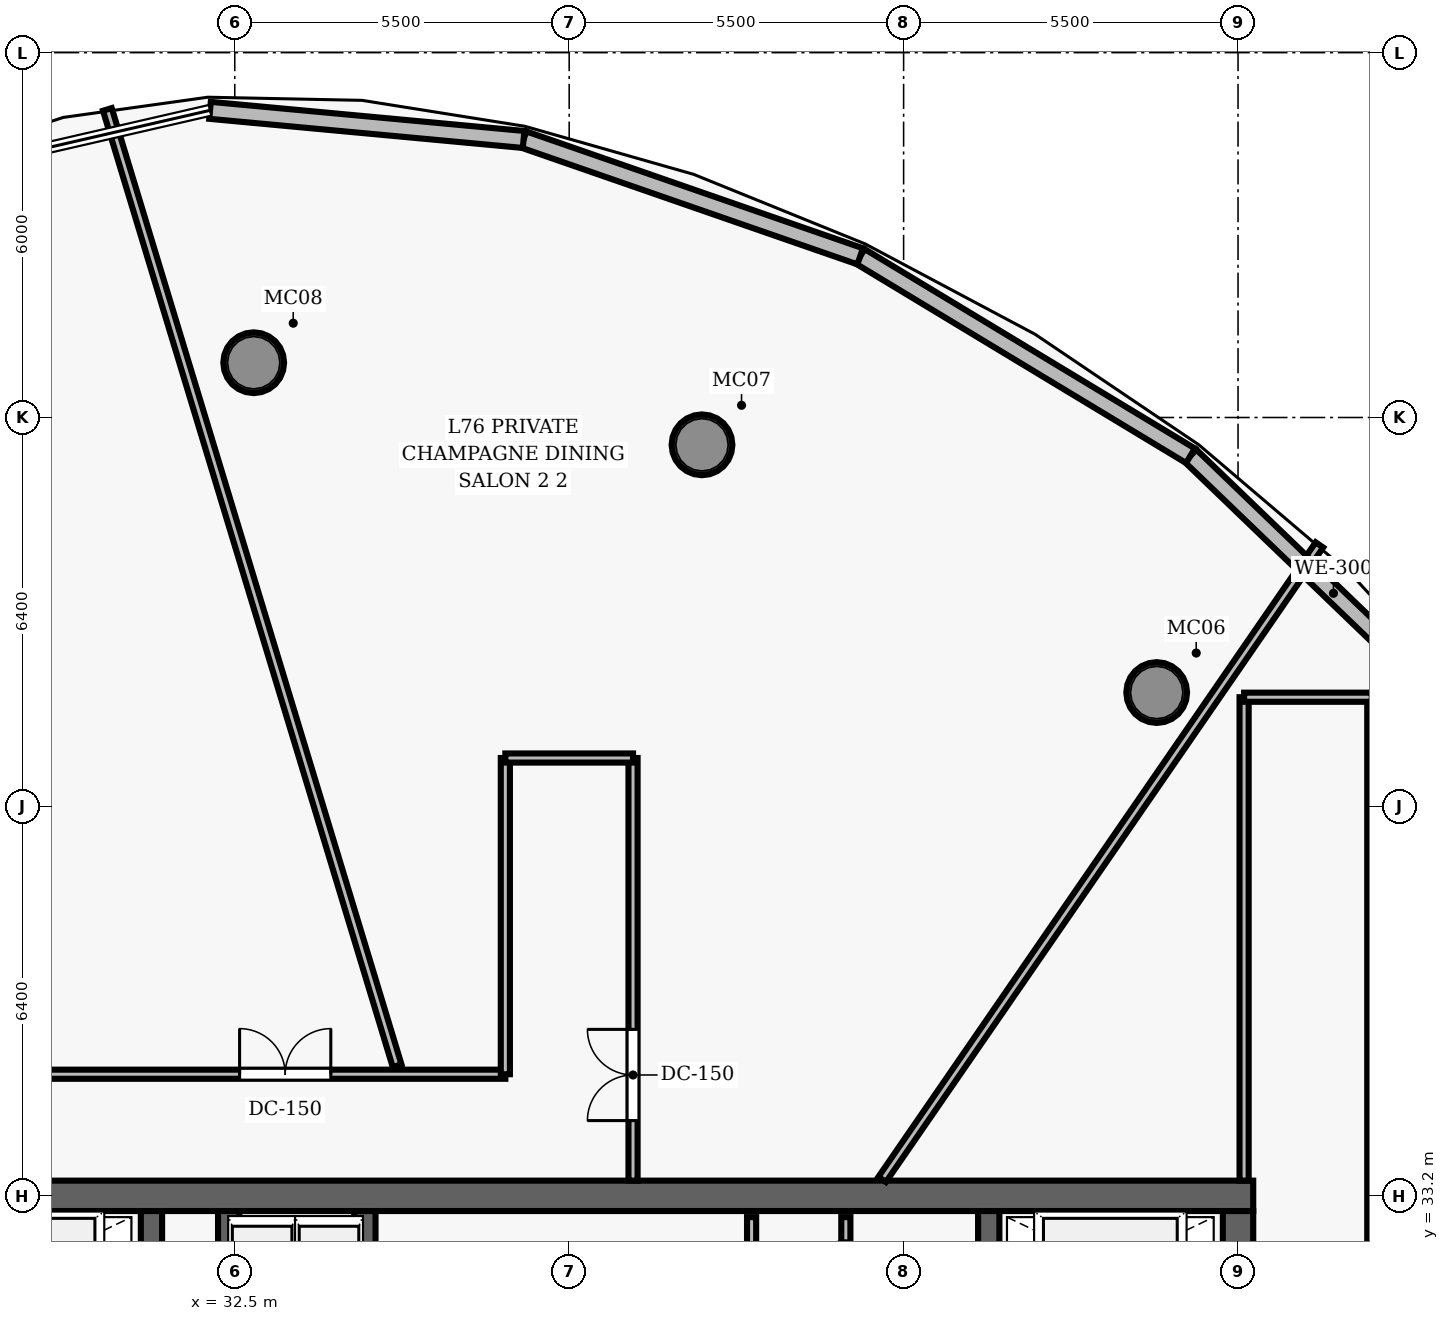
"""IFC4 building model, lengths in metres.
Left out: names, types, materials, properties, quantities, classifications, styles, units other than length and angle.
Written with IfcOpenShell. Run it as: python <this file> out.ifc"""

import sys

from ifc_helpers import new_model, si_unit, direction, frame, frame_2d, origin, origin_2d, place, context, subcontext, project, spatial, rectangle, hollow_circle, extrude, element, fill, save


model = new_model("IFC4")
c1 = context("Model", 3, precision=1e-05, world=origin(), true_north=direction((0.0, 1.0)))
c2 = subcontext(c1, "Body", "Model", "MODEL_VIEW")
j1 = project(units=[si_unit("LENGTHUNIT", "METRE"), si_unit("PLANEANGLEUNIT", "RADIAN")], contexts=[c1])
p1 = place(None, origin())
s1 = spatial("IfcSite", under=j1, at=p1, CompositionType="ELEMENT")
p2 = place(p1, origin())
s2 = spatial("IfcBuilding", under=s1, at=p2, CompositionType="ELEMENT")
p3 = place(p2, frame((0.0, 0.0, 299.8)))
s3 = spatial("IfcBuildingStorey", under=s2, at=p3, CompositionType="ELEMENT", Elevation=299.8)
p4 = place(p3, frame((26.75, 33.2, 0.0), z_axis=(0.0, 0.0, 1.0), x_axis=(1.0, 0.0, 0.0)))
e1 = element("IfcWall", 1, at=p4, inside=s3, PredefinedType="SHEAR", context=c2, shape_type="SweptSolid", body=[
    extrude(rectangle(XDim=22.5, YDim=0.5, at=frame_2d((11.25, 0.0))), origin(), (0.0, 0.0, 1.0), 3.85),
])
p5 = place(p3, frame((49.0, 19.05, 0.0), z_axis=(0.0, 0.0, 1.0), x_axis=(0.0, 1.0, 0.0)))
e2 = element("IfcWall", 2, at=p5, inside=s3, PredefinedType="SHEAR", context=c2, shape_type="SweptSolid", body=[
    extrude(rectangle(XDim=13.9, YDim=0.5, at=frame_2d((6.95, 0.0))), origin(), (0.0, 0.0, 1.0), 3.85),
])
p6 = place(p5, frame((8.2, 0.0, 0.0)))
e3 = element("IfcOpeningElement", 3, at=p6, cuts=e2, PredefinedType="OPENING", context=c2, shape_type="SweptSolid", body=[
    extrude(rectangle(XDim=1.05, YDim=2.15, at=frame_2d((0.525, 1.075))), frame((0.0, 0.26, 0.0), z_axis=(0.0, -1.0, 0.0), x_axis=(1.0, 0.0, 0.0)), (0.0, 0.0, 1.0), 0.52),
])
for number, where, z_axis, x_axis in (
    (4, (31.13, 19.05, 0.0), (0.0, 0.0, 1.0), (0.0, 1.0, 0.0)),
    (5, (44.9, 19.05, 0.0), (0.0, 0.0, 1.0), (0.0, 1.0, 0.0)),
):
    element("IfcWall", number, at=place(p3, frame(where, z_axis=z_axis, x_axis=x_axis)), inside=s3, PredefinedType="SHEAR", context=c2, shape_type="SweptSolid", body=[
        extrude(rectangle(XDim=13.9, YDim=0.35, at=frame_2d((6.95, 0.0))), origin(), (0.0, 0.0, 1.0), 3.85),
    ])
for number, where, z_axis, x_axis in (
    (6, (47.662, 41.477, 0.0), (0.0, 0.0, 1.0), (1.0, 0.0, 0.0)),
    (7, (40.185, 45.551, 0.0), (0.0, 0.0, 1.0), (1.0, 0.0, 0.0)),
    (8, (32.812, 46.901, 0.0), (0.0, 0.0, 1.0), (1.0, 0.0, 0.0)),
):
    element("IfcColumn", number, at=place(p3, frame(where, z_axis=z_axis, x_axis=x_axis)), inside=s3, PredefinedType="COLUMN", context=c2, shape_type="SweptSolid", body=[
        extrude(hollow_circle(Radius=0.5, WallThickness=0.045, at=origin_2d()), origin(), (0.0, 0.0, 1.0), 3.85),
    ])
p7 = place(p3, frame((34.64, 26.69, 0.0), z_axis=(0.0, 0.0, 1.0), x_axis=(0.0, 1.0, 0.0)))
e9 = element("IfcWall", 9, at=p7, inside=s3, PredefinedType="SHEAR", context=c2, shape_type="SweptSolid", body=[
    extrude(rectangle(XDim=6.26, YDim=0.35, at=frame_2d((3.13, 0.0))), origin(), (0.0, 0.0, 1.0), 3.85),
])
p8 = place(p7, frame((0.85, 0.0, 0.0)))
e10 = element("IfcOpeningElement", 10, at=p8, cuts=e9, PredefinedType="OPENING", context=c2, shape_type="SweptSolid", body=[
    extrude(rectangle(XDim=1.05, YDim=2.15, at=frame_2d((0.525, 1.075))), frame((0.0, 0.185, 0.0), z_axis=(0.0, -1.0, 0.0), x_axis=(1.0, 0.0, 0.0)), (0.0, 0.0, 1.0), 0.37),
])
p9 = place(p3, frame((32.4, 30.22, 0.0), z_axis=(0.0, 0.0, 1.0), x_axis=(0.0, 1.0, 0.0)))
e11 = element("IfcWall", 11, at=p9, inside=s3, PredefinedType="SHEAR", context=c2, shape_type="SweptSolid", body=[
    extrude(rectangle(XDim=2.73, YDim=0.35, at=frame_2d((1.365, 0.0))), origin(), (0.0, 0.0, 1.0), 3.04),
])
p10 = place(p3, frame((41.0, 28.95, 0.0), z_axis=(0.0, 0.0, 1.0), x_axis=(0.0, 1.0, 0.0)))
e12 = element("IfcWall", 12, at=p10, inside=s3, PredefinedType="PARTITIONING", context=c2, shape_type="SweptSolid", body=[
    extrude(rectangle(XDim=3.9, YDim=0.15, at=frame_2d((1.95, 0.0))), origin(), (0.0, 0.0, 1.0), 3.04),
])
p11 = place(p10, frame((0.7, 0.0, 0.0)))
e13 = element("IfcOpeningElement", 13, at=p11, cuts=e12, PredefinedType="OPENING", context=c2, shape_type="SweptSolid", body=[
    extrude(rectangle(XDim=0.85, YDim=2.1, at=frame_2d((0.425, 1.05))), frame((0.0, 0.085, 0.0), z_axis=(0.0, -1.0, 0.0), x_axis=(1.0, 0.0, 0.0)), (0.0, 0.0, 1.0), 0.17),
])
p12 = place(p3, frame((42.55, 28.1, 0.0), z_axis=(0.0, 0.0, 1.0), x_axis=(0.0, 1.0, 0.0)))
e14 = element("IfcWall", 14, at=p12, inside=s3, PredefinedType="PARTITIONING", context=c2, shape_type="SweptSolid", body=[
    extrude(rectangle(XDim=4.75, YDim=0.15, at=frame_2d((2.375, 0.0))), origin(), (0.0, 0.0, 1.0), 3.04),
])
p13 = place(p12, frame((0.35, 0.0, 0.0)))
e15 = element("IfcOpeningElement", 15, at=p13, cuts=e14, PredefinedType="OPENING", context=c2, shape_type="SweptSolid", body=[
    extrude(rectangle(XDim=0.85, YDim=2.1, at=frame_2d((0.425, 1.05))), frame((0.0, 0.085, 0.0), z_axis=(0.0, -1.0, 0.0), x_axis=(1.0, 0.0, 0.0)), (0.0, 0.0, 1.0), 0.17),
])
p14 = place(p12, frame((1.93, 0.0, 0.0)))
e16 = element("IfcOpeningElement", 16, at=p14, cuts=e14, PredefinedType="OPENING", context=c2, shape_type="SweptSolid", body=[
    extrude(rectangle(XDim=0.85, YDim=2.1, at=frame_2d((0.425, 1.05))), frame((0.0, 0.085, 0.0), z_axis=(0.0, -1.0, 0.0), x_axis=(1.0, 0.0, 0.0)), (0.0, 0.0, 1.0), 0.17),
])
p15 = place(p12, frame((3.51, 0.0, 0.0)))
e17 = element("IfcOpeningElement", 17, at=p15, cuts=e14, PredefinedType="OPENING", context=c2, shape_type="SweptSolid", body=[
    extrude(rectangle(XDim=0.85, YDim=2.1, at=frame_2d((0.425, 1.05))), frame((0.0, 0.085, 0.0), z_axis=(0.0, -1.0, 0.0), x_axis=(1.0, 0.0, 0.0)), (0.0, 0.0, 1.0), 0.17),
])
p16 = place(p3, frame((26.9, 35.2, 0.0), z_axis=(0.0, 0.0, 1.0), x_axis=(1.0, 0.0, 0.0)))
e18 = element("IfcWall", 18, at=p16, inside=s3, PredefinedType="PARTITIONING", context=c2, shape_type="SweptSolid", body=[
    extrude(rectangle(XDim=10.05, YDim=0.15, at=frame_2d((5.025, 0.0))), origin(), (0.0, 0.0, 1.0), 3.04),
])
p17 = place(p16, frame((5.679, 0.0, 0.0)))
e19 = element("IfcOpeningElement", 19, at=p17, cuts=e18, PredefinedType="OPENING", context=c2, shape_type="SweptSolid", body=[
    extrude(rectangle(XDim=1.5, YDim=2.2, at=frame_2d((0.75, 1.1))), frame((0.0, 0.085, 0.0), z_axis=(0.0, -1.0, 0.0), x_axis=(1.0, 0.0, 0.0)), (0.0, 0.0, 1.0), 0.17),
])
p18 = place(p3, frame((51.2, 10.6, 0.0), z_axis=(0.0, 0.0, 1.0), x_axis=(0.0, 1.0, 0.0)))
e20 = element("IfcWall", 20, at=p18, inside=s3, PredefinedType="PARTITIONING", context=c2, shape_type="SweptSolid", body=[
    extrude(rectangle(XDim=30.8, YDim=0.15, at=frame_2d((15.4, 0.0))), origin(), (0.0, 0.0, 1.0), 3.04),
])
p19 = place(p18, frame((18.976, 0.0, 0.0)))
e21 = element("IfcOpeningElement", 21, at=p19, cuts=e20, PredefinedType="OPENING", context=c2, shape_type="SweptSolid", body=[
    extrude(rectangle(XDim=1.5, YDim=2.2, at=frame_2d((0.75, 1.1))), frame((0.0, 0.085, 0.0), z_axis=(0.0, -1.0, 0.0), x_axis=(1.0, 0.0, 0.0)), (0.0, 0.0, 1.0), 0.17),
])
p20 = place(p18, frame((12.135, 0.0, 0.0)))
e22 = element("IfcOpeningElement", 22, at=p20, cuts=e20, PredefinedType="OPENING", context=c2, shape_type="SweptSolid", body=[
    extrude(rectangle(XDim=0.95, YDim=2.15, at=frame_2d((0.475, 1.075))), frame((0.0, 0.085, 0.0), z_axis=(0.0, -1.0, 0.0), x_axis=(1.0, 0.0, 0.0)), (0.0, 0.0, 1.0), 0.17),
])
p21 = place(p3, frame((49.1, 33.45, 0.0), z_axis=(0.0, 0.0, 1.0), x_axis=(0.0, 1.0, 0.0)))
e23 = element("IfcWall", 23, at=p21, inside=s3, PredefinedType="PARTITIONING", context=c2, shape_type="SweptSolid", body=[
    extrude(rectangle(XDim=7.95, YDim=0.15, at=frame_2d((3.975, 0.0))), origin(), (0.0, 0.0, 1.0), 3.04),
])
p22 = place(p3, frame((49.1, 41.4, 0.0), z_axis=(0.0, 0.0, 1.0), x_axis=(1.0, 0.0, 0.0)))
e24 = element("IfcWall", 24, at=p22, inside=s3, PredefinedType="PARTITIONING", context=c2, shape_type="SweptSolid", body=[
    extrude(rectangle(XDim=2.1, YDim=0.15, at=frame_2d((1.05, 0.0))), origin(), (0.0, 0.0, 1.0), 3.04),
])
p23 = place(p3, frame((36.95, 35.2, 0.0), z_axis=(0.0, 0.0, 1.0), x_axis=(0.0, 1.0, 0.0)))
e25 = element("IfcWall", 25, at=p23, inside=s3, PredefinedType="PARTITIONING", context=c2, shape_type="SweptSolid", body=[
    extrude(rectangle(XDim=5.2, YDim=0.15, at=frame_2d((2.6, 0.0))), origin(), (0.0, 0.0, 1.0), 3.04),
])
p24 = place(p3, frame((39.05, 33.45, 0.0), z_axis=(0.0, 0.0, 1.0), x_axis=(0.0, 1.0, 0.0)))
e26 = element("IfcWall", 26, at=p24, inside=s3, PredefinedType="PARTITIONING", context=c2, shape_type="SweptSolid", body=[
    extrude(rectangle(XDim=6.95, YDim=0.15, at=frame_2d((3.475, 0.0))), origin(), (0.0, 0.0, 1.0), 3.04),
])
p25 = place(p24, frame((0.988, 0.0, 0.0)))
e27 = element("IfcOpeningElement", 27, at=p25, cuts=e26, PredefinedType="OPENING", context=c2, shape_type="SweptSolid", body=[
    extrude(rectangle(XDim=1.5, YDim=2.2, at=frame_2d((0.75, 1.1))), frame((0.0, 0.085, 0.0), z_axis=(0.0, -1.0, 0.0), x_axis=(1.0, 0.0, 0.0)), (0.0, 0.0, 1.0), 0.17),
])
p26 = place(p3, frame((36.95, 40.4, 0.0), z_axis=(0.0, 0.0, 1.0), x_axis=(1.0, 0.0, 0.0)))
e28 = element("IfcWall", 28, at=p26, inside=s3, PredefinedType="PARTITIONING", context=c2, shape_type="SweptSolid", body=[
    extrude(rectangle(XDim=2.1, YDim=0.15, at=frame_2d((1.05, 0.0))), origin(), (0.0, 0.0, 1.0), 3.04),
])
p27 = place(p3, frame((43.148, 33.47, 0.0), z_axis=(0.0, 0.0, 1.0), x_axis=(0.56742949058, 0.82342198976, 0.0)))
e29 = element("IfcWall", 29, at=p27, inside=s3, PredefinedType="PARTITIONING", context=c2, shape_type="SweptSolid", body=[
    extrude(rectangle(XDim=12.673, YDim=0.15, at=frame_2d((6.336, 0.0))), origin(), (0.0, 0.0, 1.0), 3.04),
])
p28 = place(p3, frame((35.17, 35.34, 0.0), z_axis=(0.0, 0.0, 1.0), x_axis=(-0.289988426626, 0.957030152306, 0.0)))
e30 = element("IfcWall", 30, at=p28, inside=s3, PredefinedType="PARTITIONING", context=c2, shape_type="SweptSolid", body=[
    extrude(rectangle(XDim=16.432, YDim=0.15, at=frame_2d((8.216, 0.0))), origin(), (0.0, 0.0, 1.0), 3.04),
])
p29 = place(p3, frame((48.218, 45.371, 0.0), z_axis=(0.0, 0.0, 1.0), x_axis=(0.720629593397, -0.693320264467, 0.0)))
e31 = element("IfcWall", 31, at=p29, inside=s3, PredefinedType="SOLIDWALL", context=c2, shape_type="SweptSolid", body=[
    extrude(rectangle(XDim=6.526, YDim=0.28, at=frame_2d((3.263, 0.0))), origin(), (0.0, 0.0, 1.0), 3.625),
])
p30 = place(p3, frame((42.786, 48.651, 0.0), z_axis=(0.0, 0.0, 1.0), x_axis=(0.856080826814, -0.516841966139, 0.0)))
e32 = element("IfcWall", 32, at=p30, inside=s3, PredefinedType="SOLIDWALL", context=c2, shape_type="SweptSolid", body=[
    extrude(rectangle(XDim=6.345, YDim=0.28, at=frame_2d((3.173, 0.0))), origin(), (0.0, 0.0, 1.0), 3.625),
])
p31 = place(p3, frame((37.25, 50.572, 0.0), z_axis=(0.0, 0.0, 1.0), x_axis=(0.944702886808, -0.327927515857, 0.0)))
e33 = element("IfcWall", 33, at=p31, inside=s3, PredefinedType="SOLIDWALL", context=c2, shape_type="SweptSolid", body=[
    extrude(rectangle(XDim=5.86, YDim=0.28, at=frame_2d((2.93, 0.0))), origin(), (0.0, 0.0, 1.0), 3.625),
])
p32 = place(p3, frame((32.093, 51.051, 0.0), z_axis=(0.0, 0.0, 1.0), x_axis=(0.995713945439, -0.092486425269, 0.0)))
e34 = element("IfcWall", 34, at=p32, inside=s3, PredefinedType="SOLIDWALL", context=c2, shape_type="SweptSolid", body=[
    extrude(rectangle(XDim=5.179, YDim=0.28, at=frame_2d((2.59, 0.0))), origin(), (0.0, 0.0, 1.0), 3.625),
])
p33 = place(p15, origin())
e35 = element("IfcDoor", 35, at=p33, inside=s3, OperationType="SINGLE_SWING_LEFT", PredefinedType="DOOR", context=c2, shape_type="SweptSolid", body=[
    extrude(rectangle(XDim=0.85, YDim=2.1, at=frame_2d((0.425, 1.05))), frame((0.0, 0.025, 0.0), z_axis=(0.0, -1.0, 0.0), x_axis=(1.0, 0.0, 0.0)), (0.0, 0.0, 1.0), 0.05),
])
fill(e17, e35)
p34 = place(p25, origin())
e36 = element("IfcDoor", 36, at=p34, inside=s3, OperationType="DOUBLE_DOOR_SINGLE_SWING", PredefinedType="DOOR", context=c2, shape_type="SweptSolid", body=[
    extrude(rectangle(XDim=1.5, YDim=2.2, at=frame_2d((0.75, 1.1))), frame((0.0, 0.025, 0.0), z_axis=(0.0, -1.0, 0.0), x_axis=(1.0, 0.0, 0.0)), (0.0, 0.0, 1.0), 0.05),
])
fill(e27, e36)
p35 = place(p17, origin())
e37 = element("IfcDoor", 37, at=p35, inside=s3, OperationType="DOUBLE_DOOR_SINGLE_SWING", PredefinedType="DOOR", context=c2, shape_type="SweptSolid", body=[
    extrude(rectangle(XDim=1.5, YDim=2.2, at=frame_2d((0.75, 1.1))), frame((0.0, 0.025, 0.0), z_axis=(0.0, -1.0, 0.0), x_axis=(1.0, 0.0, 0.0)), (0.0, 0.0, 1.0), 0.05),
])
fill(e19, e37)
save(model, sys.argv[1])
